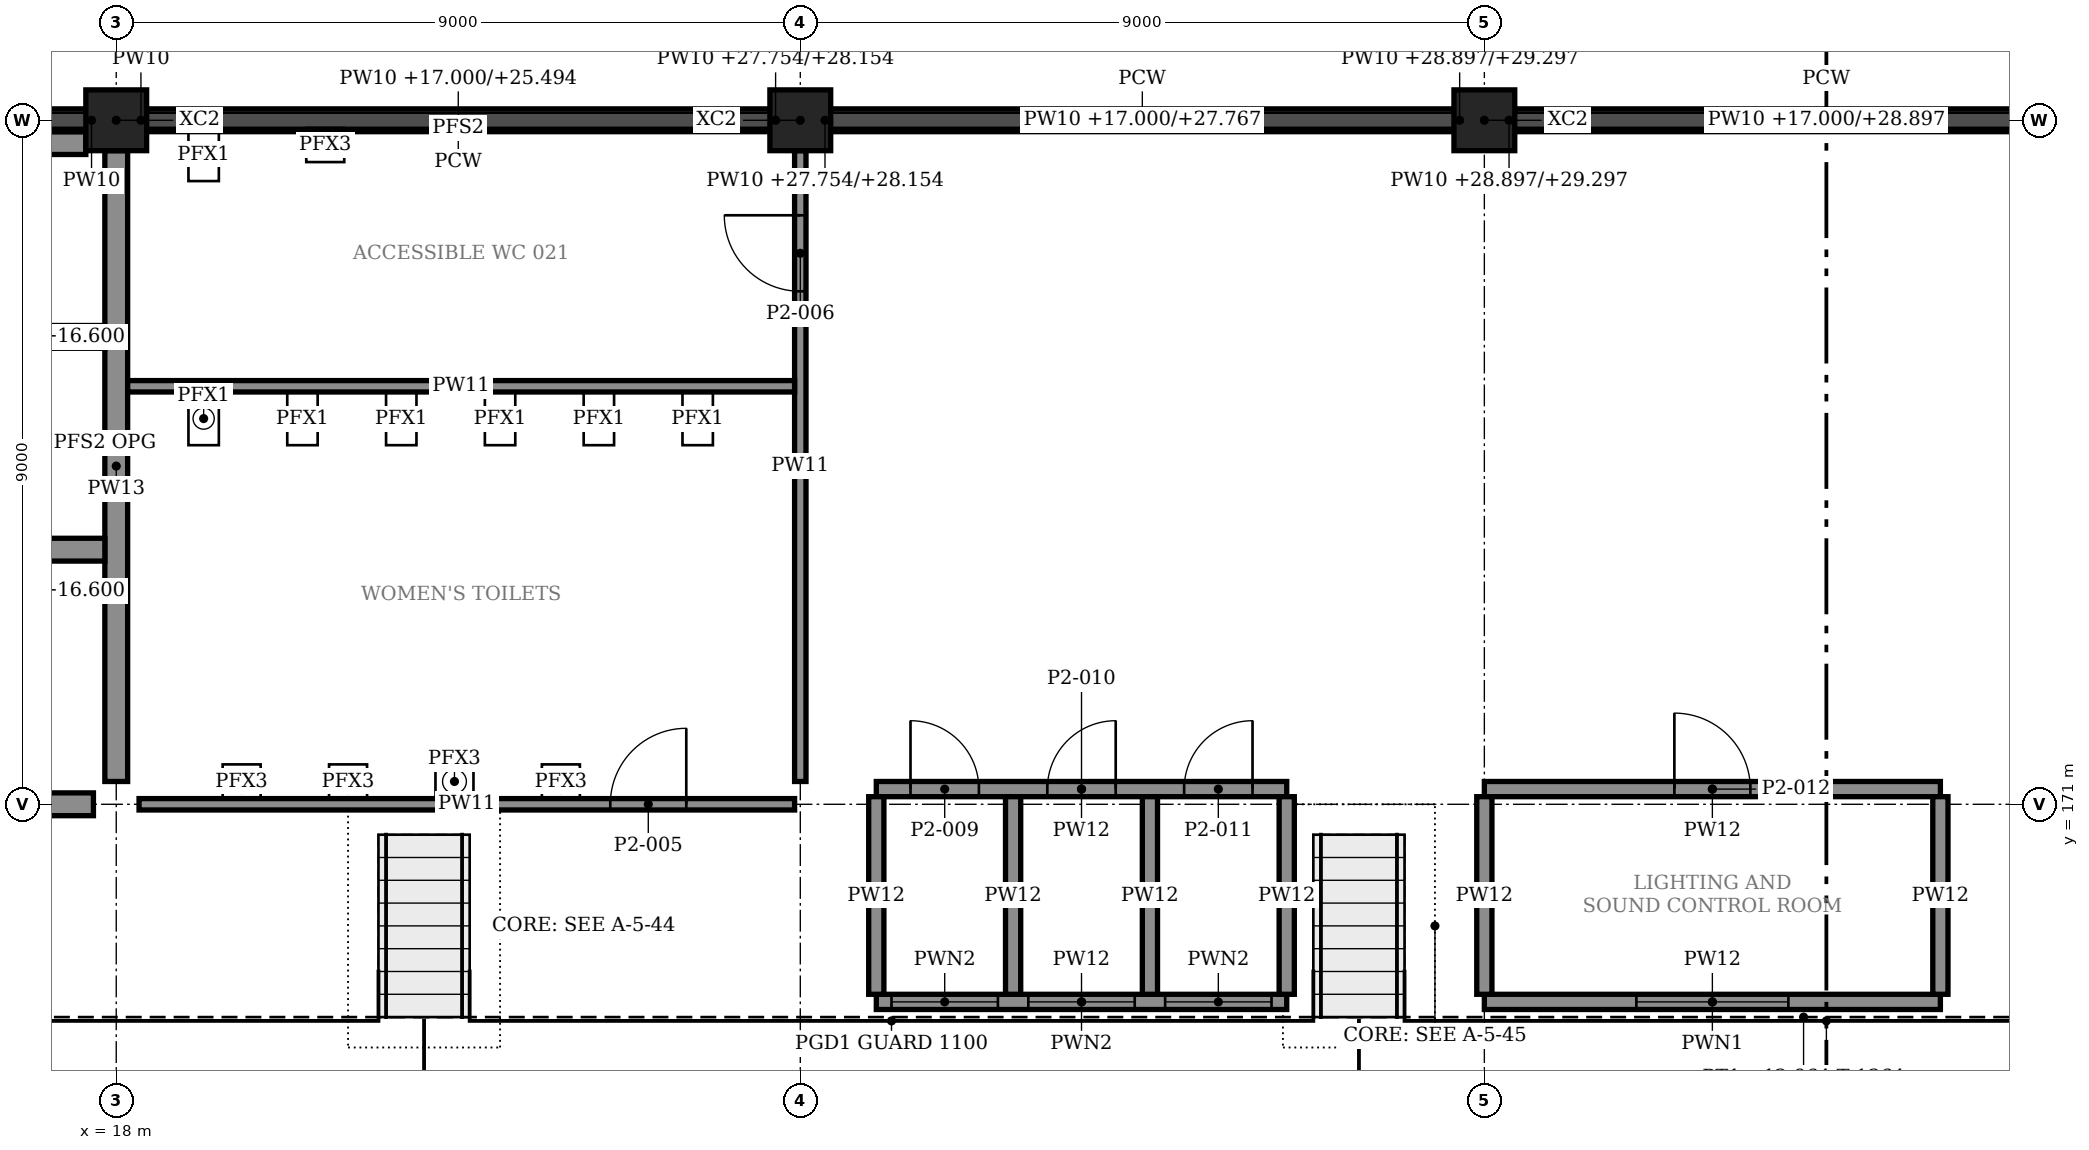
"""IFC4 building model, lengths in metres.
Left out: names, types, materials, properties, quantities, classifications, styles, units other than length and angle.
Written with IfcOpenShell. Run it as: python <this file> out.ifc"""

import sys

from ifc_helpers import new_model, si_unit, direction, frame, frame_2d, origin, origin_2d, place, context, subcontext, project, spatial, polyline, rectangle, outline, extrude, element, fill, save


model = new_model("IFC4")
c1 = context("Model", 3, precision=1e-05, world=origin(), true_north=direction((0.0, 1.0)))
c2 = subcontext(c1, "Body", "Model", "MODEL_VIEW")
j1 = project(units=[si_unit("LENGTHUNIT", "METRE"), si_unit("PLANEANGLEUNIT", "RADIAN")], contexts=[c1])
p1 = place(None, origin())
s1 = spatial("IfcSite", under=j1, at=p1, CompositionType="ELEMENT")
p2 = place(p1, origin())
s2 = spatial("IfcBuilding", under=s1, at=p2, CompositionType="ELEMENT")
p3 = place(p2, frame((0.0, 0.0, 11.5)))
s3 = spatial("IfcBuildingStorey", under=s2, at=p3, CompositionType="ELEMENT", Elevation=11.5)
for number, where, z_axis, x_axis in (
    (1, (18.0, 180.0, 0.0), (0.0, 0.0, 1.0), (1.0, 0.0, 0.0)),
    (2, (27.0, 180.0, 0.0), (0.0, 0.0, 1.0), (1.0, 0.0, 0.0)),
    (3, (36.0, 180.0, 0.0), (0.0, 0.0, 1.0), (1.0, 0.0, 0.0)),
):
    element("IfcColumn", number, at=place(p3, frame(where, z_axis=z_axis, x_axis=x_axis)), inside=s3, PredefinedType="COLUMN", context=c2, shape_type="SweptSolid", body=[
        extrude(rectangle(XDim=0.8, YDim=0.8, at=origin_2d()), origin(), (0.0, 0.0, 1.0), 5.5),
    ])
p4 = place(p3, frame((9.4, 180.0, 5.5), z_axis=(0.0, 0.0, 1.0), x_axis=(1.0, 0.0, 0.0)))
e4 = element("IfcWall", 4, at=p4, inside=s3, PredefinedType="STANDARD", context=c2, shape_type="SweptSolid", body=[
    extrude(outline(polyline([(0.0, 0.0), (8.2, 0.0), (8.2, 8.316), (0.0, 5.078), (0.0, 0.0)])), frame((0.0, 0.15, 0.0), z_axis=(0.0, -1.0, 0.0), x_axis=(1.0, 0.0, 0.0)), (0.0, 0.0, 1.0), 0.3),
])
p5 = place(p3, frame((17.6, 180.0, 13.969), z_axis=(0.0, 0.0, 1.0), x_axis=(1.0, 0.0, 0.0)))
e5 = element("IfcWall", 5, at=p5, inside=s3, PredefinedType="STANDARD", context=c2, shape_type="SweptSolid", body=[
    extrude(rectangle(XDim=0.15, YDim=0.3, at=frame_2d((0.075, 0.0))), origin(), (0.0, 0.0, 1.0), 0.4),
])
p6 = place(p3, frame((18.4, 180.0, 5.5), z_axis=(0.0, 0.0, 1.0), x_axis=(1.0, 0.0, 0.0)))
e6 = element("IfcWall", 6, at=p6, inside=s3, PredefinedType="STANDARD", context=c2, shape_type="SweptSolid", body=[
    extrude(outline(polyline([(0.0, 0.0), (8.2, 0.0), (8.2, 10.653), (0.0, 8.494), (0.0, 0.0)])), frame((0.0, 0.15, 0.0), z_axis=(0.0, -1.0, 0.0), x_axis=(1.0, 0.0, 0.0)), (0.0, 0.0, 1.0), 0.3),
])
p7 = place(p3, frame((18.25, 180.0, 13.969), z_axis=(0.0, 0.0, 1.0), x_axis=(1.0, 0.0, 0.0)))
e7 = element("IfcWall", 7, at=p7, inside=s3, PredefinedType="STANDARD", context=c2, shape_type="SweptSolid", body=[
    extrude(rectangle(XDim=0.15, YDim=0.3, at=frame_2d((0.075, 0.0))), origin(), (0.0, 0.0, 1.0), 0.4),
])
p8 = place(p3, frame((26.6, 180.0, 16.254), z_axis=(0.0, 0.0, 1.0), x_axis=(1.0, 0.0, 0.0)))
e8 = element("IfcWall", 8, at=p8, inside=s3, PredefinedType="STANDARD", context=c2, shape_type="SweptSolid", body=[
    extrude(rectangle(XDim=0.15, YDim=0.3, at=frame_2d((0.075, 0.0))), origin(), (0.0, 0.0, 1.0), 0.4),
])
p9 = place(p3, frame((27.4, 180.0, 5.5), z_axis=(0.0, 0.0, 1.0), x_axis=(1.0, 0.0, 0.0)))
e9 = element("IfcWall", 9, at=p9, inside=s3, PredefinedType="STANDARD", context=c2, shape_type="SweptSolid", body=[
    extrude(outline(polyline([(0.0, 0.0), (8.2, 0.0), (8.2, 11.846), (0.0, 10.767), (0.0, 0.0)])), frame((0.0, 0.15, 0.0), z_axis=(0.0, -1.0, 0.0), x_axis=(1.0, 0.0, 0.0)), (0.0, 0.0, 1.0), 0.3),
])
for number, where, z_axis, x_axis in (
    (10, (27.25, 180.0, 16.254), (0.0, 0.0, 1.0), (1.0, 0.0, 0.0)),
    (11, (35.6, 180.0, 17.397), (0.0, 0.0, 1.0), (1.0, 0.0, 0.0)),
):
    element("IfcWall", number, at=place(p3, frame(where, z_axis=z_axis, x_axis=x_axis)), inside=s3, PredefinedType="STANDARD", context=c2, shape_type="SweptSolid", body=[
        extrude(rectangle(XDim=0.15, YDim=0.3, at=frame_2d((0.075, 0.0))), origin(), (0.0, 0.0, 1.0), 0.4),
    ])
p10 = place(p3, frame((36.4, 180.0, 5.5), z_axis=(0.0, 0.0, 1.0), x_axis=(1.0, 0.0, 0.0)))
e12 = element("IfcWall", 12, at=p10, inside=s3, PredefinedType="STANDARD", context=c2, shape_type="SweptSolid", body=[
    extrude(outline(polyline([(0.0, 0.0), (8.2, 0.0), (8.2, 11.897), (0.0, 11.897), (0.0, 0.0)])), frame((0.0, 0.15, 0.0), z_axis=(0.0, -1.0, 0.0), x_axis=(1.0, 0.0, 0.0)), (0.0, 0.0, 1.0), 0.3),
])
p11 = place(p3, frame((36.25, 180.0, 17.397), z_axis=(0.0, 0.0, 1.0), x_axis=(1.0, 0.0, 0.0)))
e13 = element("IfcWall", 13, at=p11, inside=s3, PredefinedType="STANDARD", context=c2, shape_type="SweptSolid", body=[
    extrude(rectangle(XDim=0.15, YDim=0.3, at=frame_2d((0.075, 0.0))), origin(), (0.0, 0.0, 1.0), 0.4),
])
p12 = place(p3, frame((18.0, 171.3, 0.0), z_axis=(0.0, 0.0, 1.0), x_axis=(0.0, 1.0, 0.0)))
e14 = element("IfcWall", 14, at=p12, inside=s3, PredefinedType="SOLIDWALL", context=c2, shape_type="SweptSolid", body=[
    extrude(rectangle(XDim=8.3, YDim=0.3, at=frame_2d((4.15, 0.0))), origin(), (0.0, 0.0, 1.0), 2.5),
])
p13 = place(p3, frame((9.4, 171.0, 0.0), z_axis=(0.0, 0.0, 1.0), x_axis=(1.0, 0.0, 0.0)))
e15 = element("IfcWall", 15, at=p13, inside=s3, PredefinedType="SOLIDWALL", context=c2, shape_type="SweptSolid", body=[
    extrude(rectangle(XDim=8.3, YDim=0.3, at=frame_2d((4.15, 0.0))), origin(), (0.0, 0.0, 1.0), 2.5),
])
p14 = place(p13, frame((5.9, 0.0, 0.0)))
e16 = element("IfcOpeningElement", 16, at=p14, cuts=e15, PredefinedType="OPENING", context=c2, shape_type="SweptSolid", body=[
    extrude(rectangle(XDim=1.4, YDim=2.4, at=frame_2d((0.7, 1.2))), frame((0.0, 0.16, 0.0), z_axis=(0.0, -1.0, 0.0), x_axis=(1.0, 0.0, 0.0)), (0.0, 0.0, 1.0), 0.32),
])
p15 = place(p3, frame((9.4, 179.7, 0.0), z_axis=(0.0, 0.0, 1.0), x_axis=(1.0, 0.0, 0.0)))
e17 = element("IfcWall", 17, at=p15, inside=s3, PredefinedType="SOLIDWALL", context=c2, shape_type="SweptSolid", body=[
    extrude(rectangle(XDim=8.2, YDim=0.3, at=frame_2d((4.1, 0.0))), origin(), (0.0, 0.0, 1.0), 2.5),
])
p16 = place(p3, frame((27.0, 171.3, 0.0), z_axis=(0.0, 0.0, 1.0), x_axis=(0.0, 1.0, 0.0)))
e18 = element("IfcWall", 18, at=p16, inside=s3, PredefinedType="PARTITIONING", context=c2, shape_type="SweptSolid", body=[
    extrude(rectangle(XDim=8.3, YDim=0.15, at=frame_2d((4.15, 0.0))), origin(), (0.0, 0.0, 1.0), 2.5),
])
p17 = place(p16, frame((6.45, 0.0, 0.0)))
e19 = element("IfcOpeningElement", 19, at=p17, cuts=e18, PredefinedType="OPENING", context=c2, shape_type="SweptSolid", body=[
    extrude(rectangle(XDim=1.0, YDim=2.4, at=frame_2d((0.5, 1.2))), frame((0.0, 0.085, 0.0), z_axis=(0.0, -1.0, 0.0), x_axis=(1.0, 0.0, 0.0)), (0.0, 0.0, 1.0), 0.17),
])
p18 = place(p3, frame((18.3, 171.0, 0.0), z_axis=(0.0, 0.0, 1.0), x_axis=(1.0, 0.0, 0.0)))
e20 = element("IfcWall", 20, at=p18, inside=s3, PredefinedType="PARTITIONING", context=c2, shape_type="SweptSolid", body=[
    extrude(rectangle(XDim=8.625, YDim=0.15, at=frame_2d((4.312, 0.0))), origin(), (0.0, 0.0, 1.0), 2.5),
])
p19 = place(p18, frame((6.2, 0.0, 0.0)))
e21 = element("IfcOpeningElement", 21, at=p19, cuts=e20, PredefinedType="OPENING", context=c2, shape_type="SweptSolid", body=[
    extrude(rectangle(XDim=1.0, YDim=2.4, at=frame_2d((0.5, 1.2))), frame((0.0, 0.085, 0.0), z_axis=(0.0, -1.0, 0.0), x_axis=(1.0, 0.0, 0.0)), (0.0, 0.0, 1.0), 0.17),
])
p20 = place(p3, frame((18.15, 176.5, 0.0), z_axis=(0.0, 0.0, 1.0), x_axis=(1.0, 0.0, 0.0)))
e22 = element("IfcWall", 22, at=p20, inside=s3, PredefinedType="PARTITIONING", context=c2, shape_type="SweptSolid", body=[
    extrude(rectangle(XDim=8.775, YDim=0.15, at=frame_2d((4.388, 0.0))), origin(), (0.0, 0.0, 1.0), 2.5),
])
p21 = place(p3, frame((28.0, 168.4, 0.0), z_axis=(0.0, 0.0, 1.0), x_axis=(1.0, 0.0, 0.0)))
e23 = element("IfcWall", 23, at=p21, inside=s3, PredefinedType="PARTITIONING", context=c2, shape_type="SweptSolid", body=[
    extrude(rectangle(XDim=5.4, YDim=0.2, at=frame_2d((2.7, 0.0))), origin(), (0.0, 0.0, 1.0), 2.5),
])
p22 = place(p21, frame((0.2, 0.0, 1.4)))
e24 = element("IfcOpeningElement", 24, at=p22, cuts=e23, PredefinedType="OPENING", context=c2, shape_type="SweptSolid", body=[
    extrude(rectangle(XDim=1.4, YDim=1.1, at=frame_2d((0.7, 0.55))), frame((0.0, 0.11, 0.0), z_axis=(0.0, -1.0, 0.0), x_axis=(1.0, 0.0, 0.0)), (0.0, 0.0, 1.0), 0.22),
])
p23 = place(p21, frame((2.0, 0.0, 1.4)))
e25 = element("IfcOpeningElement", 25, at=p23, cuts=e23, PredefinedType="OPENING", context=c2, shape_type="SweptSolid", body=[
    extrude(rectangle(XDim=1.4, YDim=1.1, at=frame_2d((0.7, 0.55))), frame((0.0, 0.11, 0.0), z_axis=(0.0, -1.0, 0.0), x_axis=(1.0, 0.0, 0.0)), (0.0, 0.0, 1.0), 0.22),
])
p24 = place(p21, frame((3.8, 0.0, 1.4)))
e26 = element("IfcOpeningElement", 26, at=p24, cuts=e23, PredefinedType="OPENING", context=c2, shape_type="SweptSolid", body=[
    extrude(rectangle(XDim=1.4, YDim=1.1, at=frame_2d((0.7, 0.55))), frame((0.0, 0.11, 0.0), z_axis=(0.0, -1.0, 0.0), x_axis=(1.0, 0.0, 0.0)), (0.0, 0.0, 1.0), 0.22),
])
p25 = place(p3, frame((28.0, 171.2, 0.0), z_axis=(0.0, 0.0, 1.0), x_axis=(1.0, 0.0, 0.0)))
e27 = element("IfcWall", 27, at=p25, inside=s3, PredefinedType="PARTITIONING", context=c2, shape_type="SweptSolid", body=[
    extrude(rectangle(XDim=5.4, YDim=0.2, at=frame_2d((2.7, 0.0))), origin(), (0.0, 0.0, 1.0), 2.5),
])
p26 = place(p25, frame((0.45, 0.0, 0.0)))
e28 = element("IfcOpeningElement", 28, at=p26, cuts=e27, PredefinedType="OPENING", context=c2, shape_type="SweptSolid", body=[
    extrude(rectangle(XDim=0.9, YDim=2.1, at=frame_2d((0.45, 1.05))), frame((0.0, 0.11, 0.0), z_axis=(0.0, -1.0, 0.0), x_axis=(1.0, 0.0, 0.0)), (0.0, 0.0, 1.0), 0.22),
])
p27 = place(p25, frame((2.25, 0.0, 0.0)))
e29 = element("IfcOpeningElement", 29, at=p27, cuts=e27, PredefinedType="OPENING", context=c2, shape_type="SweptSolid", body=[
    extrude(rectangle(XDim=0.9, YDim=2.1, at=frame_2d((0.45, 1.05))), frame((0.0, 0.11, 0.0), z_axis=(0.0, -1.0, 0.0), x_axis=(1.0, 0.0, 0.0)), (0.0, 0.0, 1.0), 0.22),
])
p28 = place(p25, frame((4.05, 0.0, 0.0)))
e30 = element("IfcOpeningElement", 30, at=p28, cuts=e27, PredefinedType="OPENING", context=c2, shape_type="SweptSolid", body=[
    extrude(rectangle(XDim=0.9, YDim=2.1, at=frame_2d((0.45, 1.05))), frame((0.0, 0.11, 0.0), z_axis=(0.0, -1.0, 0.0), x_axis=(1.0, 0.0, 0.0)), (0.0, 0.0, 1.0), 0.22),
])
for number, where, z_axis, x_axis in (
    (31, (28.0, 168.5, 0.0), (0.0, 0.0, 1.0), (0.0, 1.0, 0.0)),
    (32, (29.8, 168.5, 0.0), (0.0, 0.0, 1.0), (0.0, 1.0, 0.0)),
    (33, (31.6, 168.5, 0.0), (0.0, 0.0, 1.0), (0.0, 1.0, 0.0)),
    (34, (33.4, 168.5, 0.0), (0.0, 0.0, 1.0), (0.0, 1.0, 0.0)),
):
    element("IfcWall", number, at=place(p3, frame(where, z_axis=z_axis, x_axis=x_axis)), inside=s3, PredefinedType="PARTITIONING", context=c2, shape_type="SweptSolid", body=[
        extrude(rectangle(XDim=2.6, YDim=0.2, at=frame_2d((1.3, 0.0))), origin(), (0.0, 0.0, 1.0), 2.5),
    ])
p29 = place(p3, frame((36.0, 168.4, 0.0), z_axis=(0.0, 0.0, 1.0), x_axis=(1.0, 0.0, 0.0)))
e35 = element("IfcWall", 35, at=p29, inside=s3, PredefinedType="PARTITIONING", context=c2, shape_type="SweptSolid", body=[
    extrude(rectangle(XDim=6.0, YDim=0.2, at=frame_2d((3.0, 0.0))), origin(), (0.0, 0.0, 1.0), 2.5),
])
p30 = place(p29, frame((2.0, 0.0, 1.4)))
e36 = element("IfcOpeningElement", 36, at=p30, cuts=e35, PredefinedType="OPENING", context=c2, shape_type="SweptSolid", body=[
    extrude(rectangle(XDim=2.0, YDim=1.1, at=frame_2d((1.0, 0.55))), frame((0.0, 0.11, 0.0), z_axis=(0.0, -1.0, 0.0), x_axis=(1.0, 0.0, 0.0)), (0.0, 0.0, 1.0), 0.22),
])
p31 = place(p3, frame((36.0, 171.2, 0.0), z_axis=(0.0, 0.0, 1.0), x_axis=(1.0, 0.0, 0.0)))
e37 = element("IfcWall", 37, at=p31, inside=s3, PredefinedType="PARTITIONING", context=c2, shape_type="SweptSolid", body=[
    extrude(rectangle(XDim=6.0, YDim=0.2, at=frame_2d((3.0, 0.0))), origin(), (0.0, 0.0, 1.0), 2.5),
])
p32 = place(p31, frame((2.5, 0.0, 0.0)))
e38 = element("IfcOpeningElement", 38, at=p32, cuts=e37, PredefinedType="OPENING", context=c2, shape_type="SweptSolid", body=[
    extrude(rectangle(XDim=1.0, YDim=2.4, at=frame_2d((0.5, 1.2))), frame((0.0, 0.11, 0.0), z_axis=(0.0, -1.0, 0.0), x_axis=(1.0, 0.0, 0.0)), (0.0, 0.0, 1.0), 0.22),
])
for number, where, z_axis, x_axis in (
    (39, (36.0, 168.5, 0.0), (0.0, 0.0, 1.0), (0.0, 1.0, 0.0)),
    (40, (42.0, 168.5, 0.0), (0.0, 0.0, 1.0), (0.0, 1.0, 0.0)),
):
    element("IfcWall", number, at=place(p3, frame(where, z_axis=z_axis, x_axis=x_axis)), inside=s3, PredefinedType="PARTITIONING", context=c2, shape_type="SweptSolid", body=[
        extrude(rectangle(XDim=2.6, YDim=0.2, at=frame_2d((1.3, 0.0))), origin(), (0.0, 0.0, 1.0), 2.5),
    ])
p33 = place(p3, frame((15.25, 174.35, 0.0), z_axis=(0.0, 0.0, 1.0), x_axis=(1.0, 0.0, 0.0)))
e41 = element("IfcWall", 41, at=p33, inside=s3, PredefinedType="SOLIDWALL", context=c2, shape_type="SweptSolid", body=[
    extrude(rectangle(XDim=2.6, YDim=0.3, at=frame_2d((1.3, 0.0))), origin(), (0.0, 0.0, 1.0), 5.1),
])
p34 = place(p33, frame((0.55, 0.0, 0.0)))
e42 = element("IfcOpeningElement", 42, at=p34, cuts=e41, PredefinedType="OPENING", context=c2, shape_type="SweptSolid", body=[
    extrude(rectangle(XDim=1.1, YDim=2.1, at=frame_2d((0.55, 1.05))), frame((0.0, 0.16, 0.0), z_axis=(0.0, -1.0, 0.0), x_axis=(1.0, 0.0, 0.0)), (0.0, 0.0, 1.0), 0.32),
])
p35 = place(p3, frame((15.25, 177.15, 0.0), z_axis=(0.0, 0.0, 1.0), x_axis=(1.0, 0.0, 0.0)))
e43 = element("IfcWall", 43, at=p35, inside=s3, PredefinedType="SOLIDWALL", context=c2, shape_type="SweptSolid", body=[
    extrude(rectangle(XDim=2.6, YDim=0.3, at=frame_2d((1.3, 0.0))), origin(), (0.0, 0.0, 1.0), 5.1),
])
p36 = place(p19, origin())
e44 = element("IfcDoor", 44, at=p36, inside=s3, OperationType="SINGLE_SWING_RIGHT", PredefinedType="DOOR", context=c2, shape_type="SweptSolid", body=[
    extrude(rectangle(XDim=1.0, YDim=2.4, at=frame_2d((0.5, 1.2))), frame((0.0, 0.025, 0.0), z_axis=(0.0, -1.0, 0.0), x_axis=(1.0, 0.0, 0.0)), (0.0, 0.0, 1.0), 0.05),
])
fill(e21, e44)
p37 = place(p17, origin())
e45 = element("IfcDoor", 45, at=p37, inside=s3, OperationType="SINGLE_SWING_RIGHT", PredefinedType="DOOR", context=c2, shape_type="SweptSolid", body=[
    extrude(rectangle(XDim=1.0, YDim=2.4, at=frame_2d((0.5, 1.2))), frame((0.0, 0.025, 0.0), z_axis=(0.0, -1.0, 0.0), x_axis=(1.0, 0.0, 0.0)), (0.0, 0.0, 1.0), 0.05),
])
fill(e19, e45)
p38 = place(p26, origin())
e46 = element("IfcDoor", 46, at=p38, inside=s3, OperationType="SINGLE_SWING_LEFT", PredefinedType="DOOR", context=c2, shape_type="SweptSolid", body=[
    extrude(rectangle(XDim=0.9, YDim=2.1, at=frame_2d((0.45, 1.05))), frame((0.0, 0.025, 0.0), z_axis=(0.0, -1.0, 0.0), x_axis=(1.0, 0.0, 0.0)), (0.0, 0.0, 1.0), 0.05),
])
fill(e28, e46)
p39 = place(p22, origin())
e47 = element("IfcWindow", 47, at=p39, inside=s3, PartitioningType="DOUBLE_PANEL_VERTICAL", PredefinedType="WINDOW", context=c2, shape_type="SweptSolid", body=[
    extrude(rectangle(XDim=1.4, YDim=1.1, at=frame_2d((0.7, 0.55))), frame((0.0, 0.03, 0.0), z_axis=(0.0, -1.0, 0.0), x_axis=(1.0, 0.0, 0.0)), (0.0, 0.0, 1.0), 0.06),
])
fill(e24, e47)
p40 = place(p27, origin())
e48 = element("IfcDoor", 48, at=p40, inside=s3, OperationType="SINGLE_SWING_RIGHT", PredefinedType="DOOR", context=c2, shape_type="SweptSolid", body=[
    extrude(rectangle(XDim=0.9, YDim=2.1, at=frame_2d((0.45, 1.05))), frame((0.0, 0.025, 0.0), z_axis=(0.0, -1.0, 0.0), x_axis=(1.0, 0.0, 0.0)), (0.0, 0.0, 1.0), 0.05),
])
fill(e29, e48)
p41 = place(p23, origin())
e49 = element("IfcWindow", 49, at=p41, inside=s3, PartitioningType="DOUBLE_PANEL_VERTICAL", PredefinedType="WINDOW", context=c2, shape_type="SweptSolid", body=[
    extrude(rectangle(XDim=1.4, YDim=1.1, at=frame_2d((0.7, 0.55))), frame((0.0, 0.03, 0.0), z_axis=(0.0, -1.0, 0.0), x_axis=(1.0, 0.0, 0.0)), (0.0, 0.0, 1.0), 0.06),
])
fill(e25, e49)
p42 = place(p28, origin())
e50 = element("IfcDoor", 50, at=p42, inside=s3, OperationType="SINGLE_SWING_RIGHT", PredefinedType="DOOR", context=c2, shape_type="SweptSolid", body=[
    extrude(rectangle(XDim=0.9, YDim=2.1, at=frame_2d((0.45, 1.05))), frame((0.0, 0.025, 0.0), z_axis=(0.0, -1.0, 0.0), x_axis=(1.0, 0.0, 0.0)), (0.0, 0.0, 1.0), 0.05),
])
fill(e30, e50)
p43 = place(p24, origin())
e51 = element("IfcWindow", 51, at=p43, inside=s3, PartitioningType="DOUBLE_PANEL_VERTICAL", PredefinedType="WINDOW", context=c2, shape_type="SweptSolid", body=[
    extrude(rectangle(XDim=1.4, YDim=1.1, at=frame_2d((0.7, 0.55))), frame((0.0, 0.03, 0.0), z_axis=(0.0, -1.0, 0.0), x_axis=(1.0, 0.0, 0.0)), (0.0, 0.0, 1.0), 0.06),
])
fill(e26, e51)
p44 = place(p32, origin())
e52 = element("IfcDoor", 52, at=p44, inside=s3, OperationType="SINGLE_SWING_LEFT", PredefinedType="DOOR", context=c2, shape_type="SweptSolid", body=[
    extrude(rectangle(XDim=1.0, YDim=2.4, at=frame_2d((0.5, 1.2))), frame((0.0, 0.025, 0.0), z_axis=(0.0, -1.0, 0.0), x_axis=(1.0, 0.0, 0.0)), (0.0, 0.0, 1.0), 0.05),
])
fill(e38, e52)
p45 = place(p30, origin())
e53 = element("IfcWindow", 53, at=p45, inside=s3, PartitioningType="DOUBLE_PANEL_VERTICAL", PredefinedType="WINDOW", context=c2, shape_type="SweptSolid", body=[
    extrude(rectangle(XDim=2.0, YDim=1.1, at=frame_2d((1.0, 0.55))), frame((0.0, 0.03, 0.0), z_axis=(0.0, -1.0, 0.0), x_axis=(1.0, 0.0, 0.0)), (0.0, 0.0, 1.0), 0.06),
])
fill(e36, e53)
save(model, sys.argv[1])
